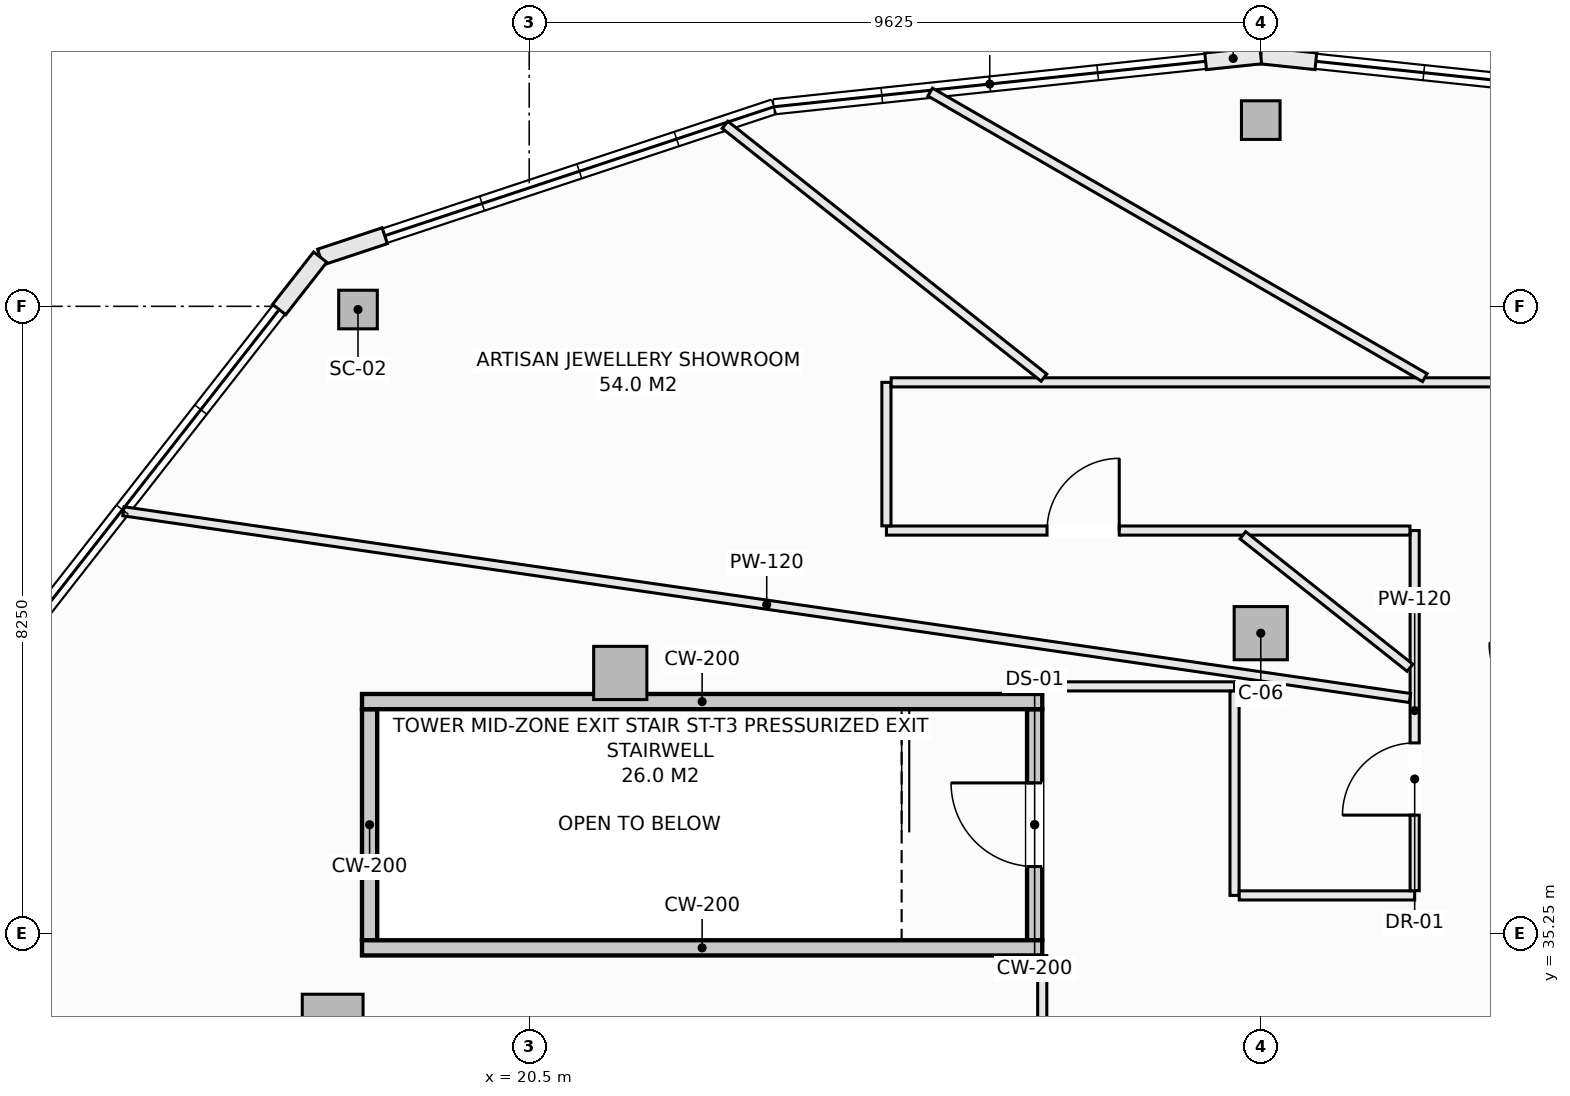
"""IFC4 building model, lengths in metres.
Left out: names, types, materials, properties, quantities, classifications, styles, units other than length and angle.
Written with IfcOpenShell. Run it as: python <this file> out.ifc"""

import sys

from ifc_helpers import new_model, si_unit, direction, frame, frame_2d, origin, origin_2d, place, context, subcontext, project, spatial, rectangle, hollow_rectangle, extrude, element, fill, save


model = new_model("IFC4")
c1 = context("Model", 3, precision=1e-05, world=origin(), true_north=direction((0.0, 1.0)))
c2 = subcontext(c1, "Body", "Model", "MODEL_VIEW")
j1 = project(units=[si_unit("LENGTHUNIT", "METRE"), si_unit("PLANEANGLEUNIT", "RADIAN")], contexts=[c1])
p1 = place(None, origin())
s1 = spatial("IfcSite", under=j1, at=p1, CompositionType="ELEMENT")
p2 = place(p1, origin())
s2 = spatial("IfcBuilding", under=s1, at=p2, CompositionType="ELEMENT")
p3 = place(p2, frame((0.0, 0.0, 191.9)))
s3 = spatial("IfcBuildingStorey", under=s2, at=p3, CompositionType="ELEMENT", Elevation=191.9)
for number, where, z_axis, x_axis in (
    (1, (30.125, 45.95, -0.28), (0.0, 0.0, 1.0), (1.0, 0.0, 0.0)),
    (2, (18.247, 43.458, -0.28), (0.0, 0.0, 1.0), (1.0, 0.0, 0.0)),
):
    element("IfcColumn", number, at=place(p3, frame(where, z_axis=z_axis, x_axis=x_axis)), inside=s3, PredefinedType="COLUMN", context=c2, shape_type="SweptSolid", body=[
        extrude(hollow_rectangle(XDim=0.508, YDim=0.508, WallThickness=0.019, at=origin_2d()), origin(), (0.0, 0.0, 1.0), 4.51),
    ])
for number, where, z_axis, x_axis in (
    (3, (30.125, 39.2, -0.28), (0.0, 0.0, 1.0), (1.0, 0.0, 0.0)),
    (4, (21.698, 38.677, -0.28), (0.0, 0.0, 1.0), (1.0, 0.0, 0.0)),
):
    element("IfcColumn", number, at=place(p3, frame(where, z_axis=z_axis, x_axis=x_axis)), inside=s3, PredefinedType="COLUMN", context=c2, shape_type="SweptSolid", body=[
        extrude(rectangle(XDim=0.7, YDim=0.7, at=origin_2d()), origin(), (0.0, 0.0, 1.0), 4.51),
    ])
p4 = place(p3, frame((17.914, 34.05, -0.28), z_axis=(0.0, 0.0, 1.0), x_axis=(1.0, 0.0, 0.0)))
e5 = element("IfcColumn", 5, at=p4, inside=s3, PredefinedType="PILASTER", context=c2, shape_type="SweptSolid", body=[
    extrude(rectangle(XDim=0.8, YDim=0.8, at=origin_2d()), origin(), (0.0, 0.0, 1.0), 4.51),
])
for number, where, z_axis, x_axis in (
    (6, (30.125, 46.8, 0.0), (0.0, 0.0, 1.0), (0.994, -0.105, 0.0)),
    (7, (29.4, 46.724, 0.0), (0.0, 0.0, 1.0), (0.994, 0.105, 0.0)),
):
    element("IfcWall", number, at=place(p3, frame(where, z_axis=z_axis, x_axis=x_axis)), inside=s3, PredefinedType="SOLIDWALL", context=c2, shape_type="SweptSolid", body=[
        extrude(rectangle(XDim=0.729, YDim=0.22, at=frame_2d((0.365, 0.0))), origin(), (0.0, 0.0, 1.0), 3.805),
    ])
p5 = place(p3, frame((17.75, 44.147, 0.0), z_axis=(0.0, 0.0, 1.0), x_axis=(0.949254567626, 0.314508769101, 0.0)))
e8 = element("IfcWall", 8, at=p5, inside=s3, PredefinedType="SOLIDWALL", context=c2, shape_type="SweptSolid", body=[
    extrude(rectangle(XDim=0.895, YDim=0.22, at=frame_2d((0.448, 0.0))), origin(), (0.0, 0.0, 1.0), 3.805),
])
p6 = place(p3, frame((17.21, 43.458, 0.0), z_axis=(0.0, 0.0, 1.0), x_axis=(0.616466126167, 0.787381429352, 0.0)))
e9 = element("IfcWall", 9, at=p6, inside=s3, PredefinedType="SOLIDWALL", context=c2, shape_type="SweptSolid", body=[
    extrude(rectangle(XDim=0.876, YDim=0.22, at=frame_2d((0.438, 0.0))), origin(), (0.0, 0.0, 1.0), 3.805),
])
p7 = place(p3, frame((27.15, 35.16, -0.28), z_axis=(0.0, 0.0, 1.0), x_axis=(0.0, 1.0, 0.0)))
e10 = element("IfcWall", 10, at=p7, inside=s3, PredefinedType="SHEAR", context=c2, shape_type="SweptSolid", body=[
    extrude(rectangle(XDim=3.04, YDim=0.2, at=frame_2d((1.52, 0.0))), origin(), (0.0, 0.0, 1.0), 4.51),
])
p8 = place(p7, frame((0.97, 0.0, 0.28)))
e11 = element("IfcOpeningElement", 11, at=p8, cuts=e10, PredefinedType="OPENING", context=c2, shape_type="SweptSolid", body=[
    extrude(rectangle(XDim=1.1, YDim=2.15, at=frame_2d((0.55, 1.075))), frame((0.0, 0.11, 0.0), z_axis=(0.0, -1.0, 0.0), x_axis=(1.0, 0.0, 0.0)), (0.0, 0.0, 1.0), 0.22),
])
p9 = place(p3, frame((18.4, 35.16, -0.28), z_axis=(0.0, 0.0, 1.0), x_axis=(0.0, 1.0, 0.0)))
e12 = element("IfcWall", 12, at=p9, inside=s3, PredefinedType="SHEAR", context=c2, shape_type="SweptSolid", body=[
    extrude(rectangle(XDim=3.04, YDim=0.2, at=frame_2d((1.52, 0.0))), origin(), (0.0, 0.0, 1.0), 4.51),
])
for number, where, z_axis, x_axis in (
    (13, (18.3, 38.3, -0.28), (0.0, 0.0, 1.0), (1.0, 0.0, 0.0)),
    (14, (18.3, 35.06, -0.28), (0.0, 0.0, 1.0), (1.0, 0.0, 0.0)),
):
    element("IfcWall", number, at=place(p3, frame(where, z_axis=z_axis, x_axis=x_axis)), inside=s3, PredefinedType="SHEAR", context=c2, shape_type="SweptSolid", body=[
        extrude(rectangle(XDim=8.95, YDim=0.2, at=frame_2d((4.475, 0.0))), origin(), (0.0, 0.0, 1.0), 4.51),
    ])
p10 = place(p3, frame((27.25, 34.002, 0.0), z_axis=(0.0, 0.0, 1.0), x_axis=(0.0, 1.0, 0.0)))
e15 = element("IfcWall", 15, at=p10, inside=s3, PredefinedType="PARTITIONING", context=c2, shape_type="SweptSolid", body=[
    extrude(rectangle(XDim=0.956, YDim=0.12, at=frame_2d((0.478, 0.0))), origin(), (0.0, 0.0, 1.0), 4.23),
])
p11 = place(p3, frame((27.25, 38.5, 0.0), z_axis=(0.0, 0.0, 1.0), x_axis=(1.0, 0.0, 0.0)))
e16 = element("IfcWall", 16, at=p11, inside=s3, PredefinedType="PARTITIONING", context=c2, shape_type="SweptSolid", body=[
    extrude(rectangle(XDim=2.53, YDim=0.12, at=frame_2d((1.265, 0.0))), origin(), (0.0, 0.0, 1.0), 4.23),
])
p12 = place(p3, frame((29.78, 35.75, 0.0), z_axis=(0.0, 0.0, 1.0), x_axis=(0.0, 1.0, 0.0)))
e17 = element("IfcWall", 17, at=p12, inside=s3, PredefinedType="PARTITIONING", context=c2, shape_type="SweptSolid", body=[
    extrude(rectangle(XDim=2.688, YDim=0.12, at=frame_2d((1.344, 0.0))), origin(), (0.0, 0.0, 1.0), 4.23),
])
p13 = place(p3, frame((29.842, 35.75, 0.0), z_axis=(0.0, 0.0, 1.0), x_axis=(1.0, 0.0, 0.0)))
e18 = element("IfcWall", 18, at=p13, inside=s3, PredefinedType="PARTITIONING", context=c2, shape_type="SweptSolid", body=[
    extrude(rectangle(XDim=2.308, YDim=0.12, at=frame_2d((1.154, 0.0))), origin(), (0.0, 0.0, 1.0), 4.23),
])
p14 = place(p3, frame((32.15, 35.812, 0.0), z_axis=(0.0, 0.0, 1.0), x_axis=(0.0, 1.0, 0.0)))
e19 = element("IfcWall", 19, at=p14, inside=s3, PredefinedType="PARTITIONING", context=c2, shape_type="SweptSolid", body=[
    extrude(rectangle(XDim=4.738, YDim=0.12, at=frame_2d((2.369, 0.0))), origin(), (0.0, 0.0, 1.0), 4.23),
])
p15 = place(p14, frame((0.994, 0.0, 0.0)))
e20 = element("IfcOpeningElement", 20, at=p15, cuts=e19, PredefinedType="OPENING", context=c2, shape_type="SweptSolid", body=[
    extrude(rectangle(XDim=0.95, YDim=2.1, at=frame_2d((0.475, 1.05))), frame((0.0, 0.07, 0.0), z_axis=(0.0, -1.0, 0.0), x_axis=(1.0, 0.0, 0.0)), (0.0, 0.0, 1.0), 0.14),
])
p16 = place(p3, frame((25.2, 40.55, 0.0), z_axis=(0.0, 0.0, 1.0), x_axis=(1.0, 0.0, 0.0)))
e21 = element("IfcWall", 21, at=p16, inside=s3, PredefinedType="PARTITIONING", context=c2, shape_type="SweptSolid", body=[
    extrude(rectangle(XDim=6.888, YDim=0.12, at=frame_2d((3.444, 0.0))), origin(), (0.0, 0.0, 1.0), 4.23),
])
p17 = place(p16, frame((2.113, 0.0, 0.0)))
e22 = element("IfcOpeningElement", 22, at=p17, cuts=e21, PredefinedType="OPENING", context=c2, shape_type="SweptSolid", body=[
    extrude(rectangle(XDim=0.95, YDim=2.1, at=frame_2d((0.475, 1.05))), frame((0.0, 0.07, 0.0), z_axis=(0.0, -1.0, 0.0), x_axis=(1.0, 0.0, 0.0)), (0.0, 0.0, 1.0), 0.14),
])
p18 = place(p3, frame((25.2, 40.612, 0.0), z_axis=(0.0, 0.0, 1.0), x_axis=(0.0, 1.0, 0.0)))
e23 = element("IfcWall", 23, at=p18, inside=s3, PredefinedType="PARTITIONING", context=c2, shape_type="SweptSolid", body=[
    extrude(rectangle(XDim=1.888, YDim=0.12, at=frame_2d((0.944, 0.0))), origin(), (0.0, 0.0, 1.0), 3.912),
])
p19 = place(p3, frame((25.262, 42.5, 0.0), z_axis=(0.0, 0.0, 1.0), x_axis=(1.0, 0.0, 0.0)))
e24 = element("IfcWall", 24, at=p19, inside=s3, PredefinedType="PARTITIONING", context=c2, shape_type="SweptSolid", body=[
    extrude(rectangle(XDim=10.626, YDim=0.12, at=frame_2d((5.313, 0.0))), origin(), (0.0, 0.0, 1.0), 4.23),
])
p20 = place(p19, frame((8.077, 0.0, 0.0)))
e25 = element("IfcOpeningElement", 25, at=p20, cuts=e24, PredefinedType="OPENING", context=c2, shape_type="SweptSolid", body=[
    extrude(rectangle(XDim=0.95, YDim=2.1, at=frame_2d((0.475, 1.05))), frame((0.0, 0.07, 0.0), z_axis=(0.0, -1.0, 0.0), x_axis=(1.0, 0.0, 0.0)), (0.0, 0.0, 1.0), 0.14),
])
p21 = place(p3, frame((15.162, 40.803, 0.0), z_axis=(0.0, 0.0, 1.0), x_axis=(0.9896318604, -0.143627228896, 0.0)))
e26 = element("IfcWall", 26, at=p21, inside=s3, PredefinedType="PARTITIONING", context=c2, shape_type="SweptSolid", body=[
    extrude(rectangle(XDim=17.104, YDim=0.12, at=frame_2d((8.552, 0.0))), origin(), (0.0, 0.0, 1.0), 3.678),
])
p22 = place(p3, frame((23.076, 45.888, 0.0), z_axis=(0.0, 0.0, 1.0), x_axis=(0.78369436583, -0.62114663403, 0.0)))
e27 = element("IfcWall", 27, at=p22, inside=s3, PredefinedType="PARTITIONING", context=c2, shape_type="SweptSolid", body=[
    extrude(rectangle(XDim=5.354, YDim=0.12, at=frame_2d((2.677, 0.0))), origin(), (0.0, 0.0, 1.0), 4.23),
])
p23 = place(p3, frame((29.889, 40.488, 0.0), z_axis=(0.0, 0.0, 1.0), x_axis=(0.783653963105, -0.62119760633, 0.0)))
e28 = element("IfcWall", 28, at=p23, inside=s3, PredefinedType="PARTITIONING", context=c2, shape_type="SweptSolid", body=[
    extrude(rectangle(XDim=2.806, YDim=0.12, at=frame_2d((1.403, 0.0))), origin(), (0.0, 0.0, 1.0), 3.678),
])
p24 = place(p3, frame((25.776, 46.319, 0.0), z_axis=(0.0, 0.0, 1.0), x_axis=(0.866051412203, -0.499954949392, 0.0)))
e29 = element("IfcWall", 29, at=p24, inside=s3, PredefinedType="PARTITIONING", context=c2, shape_type="SweptSolid", body=[
    extrude(rectangle(XDim=7.514, YDim=0.12, at=frame_2d((3.757, 0.0))), origin(), (0.0, 0.0, 1.0), 4.23),
])
p25 = place(p8, origin())
e30 = element("IfcDoor", 30, at=p25, inside=s3, OperationType="SINGLE_SWING_RIGHT", PredefinedType="DOOR", context=c2, shape_type="SweptSolid", body=[
    extrude(rectangle(XDim=1.1, YDim=2.15, at=frame_2d((0.55, 1.075))), frame((0.0, 0.025, 0.0), z_axis=(0.0, -1.0, 0.0), x_axis=(1.0, 0.0, 0.0)), (0.0, 0.0, 1.0), 0.05),
])
fill(e11, e30)
p26 = place(p15, origin())
e31 = element("IfcDoor", 31, at=p26, inside=s3, OperationType="SINGLE_SWING_LEFT", PredefinedType="DOOR", context=c2, shape_type="SweptSolid", body=[
    extrude(rectangle(XDim=0.95, YDim=2.1, at=frame_2d((0.475, 1.05))), frame((0.0, 0.025, 0.0), z_axis=(0.0, -1.0, 0.0), x_axis=(1.0, 0.0, 0.0)), (0.0, 0.0, 1.0), 0.05),
])
fill(e20, e31)
p27 = place(p17, origin())
e32 = element("IfcDoor", 32, at=p27, inside=s3, OperationType="SINGLE_SWING_RIGHT", PredefinedType="DOOR", context=c2, shape_type="SweptSolid", body=[
    extrude(rectangle(XDim=0.95, YDim=2.1, at=frame_2d((0.475, 1.05))), frame((0.0, 0.025, 0.0), z_axis=(0.0, -1.0, 0.0), x_axis=(1.0, 0.0, 0.0)), (0.0, 0.0, 1.0), 0.05),
])
fill(e22, e32)
save(model, sys.argv[1])
